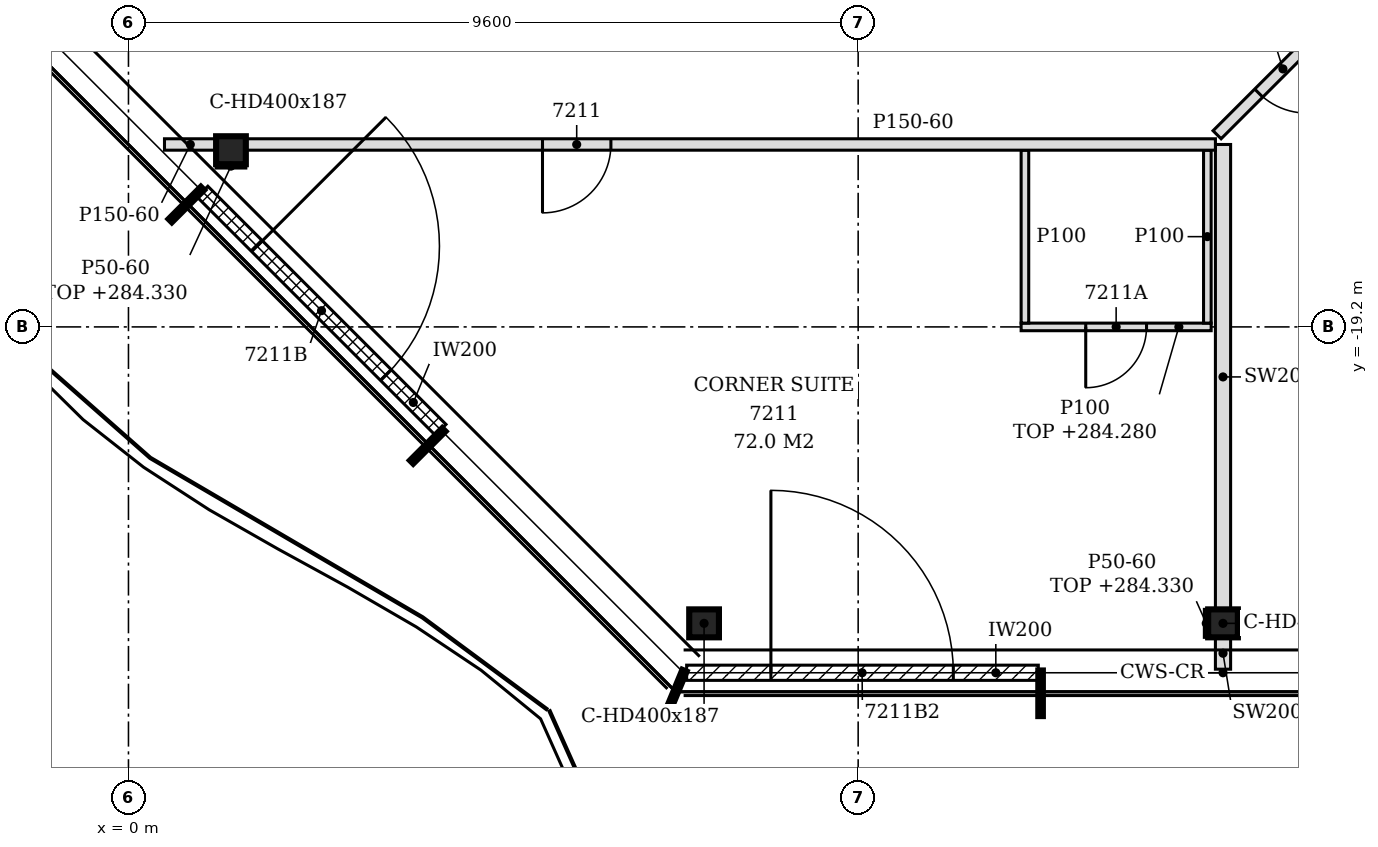
"""IFC4 building model, lengths in metres.
Left out: names, types, materials, properties, quantities, classifications, styles, units other than length and angle.
Written with IfcOpenShell. Run it as: python <this file> out.ifc"""

import sys

from ifc_helpers import new_model, si_unit, direction, frame, frame_2d, origin, origin_2d, place, context, subcontext, project, spatial, polyline, rectangle, i_section, outline, extrude, element, fill, save


model = new_model("IFC4")
c1 = context("Model", 3, precision=1e-05, world=origin(), true_north=direction((0.0, 1.0)))
c2 = subcontext(c1, "Body", "Model", "MODEL_VIEW")
j1 = project(units=[si_unit("LENGTHUNIT", "METRE"), si_unit("PLANEANGLEUNIT", "RADIAN")], contexts=[c1])
p1 = place(None, origin())
s1 = spatial("IfcSite", under=j1, at=p1, CompositionType="ELEMENT")
p2 = place(p1, origin())
s2 = spatial("IfcBuilding", under=s1, at=p2, CompositionType="ELEMENT")
p3 = place(p2, frame((0.0, 0.0, 281.4)))
s3 = spatial("IfcBuildingStorey", under=s2, at=p3, CompositionType="ELEMENT", Elevation=281.4)
for number, where, z_axis, x_axis in (
    (1, (7.573, -23.1, -0.15), (0.0, 0.0, 1.0), (1.0, 0.0, 0.0)),
    (2, (14.4, -23.1, -0.15), (0.0, 0.0, 1.0), (1.0, 0.0, 0.0)),
    (3, (1.348, -16.876, -0.15), (0.0, 0.0, 1.0), (1.0, 0.0, 0.0)),
):
    element("IfcColumn", number, at=place(p3, frame(where, z_axis=z_axis, x_axis=x_axis)), inside=s3, PredefinedType="COLUMN", context=c2, shape_type="SweptSolid", body=[
        extrude(i_section(OverallWidth=0.391, OverallDepth=0.368, WebThickness=0.015, FlangeThickness=0.024, FilletRadius=0.015, at=origin_2d()), origin(), (0.0, 0.0, 1.0), 3.6),
    ])
p4 = place(p3, frame((7.344, -23.75, 0.0), z_axis=(0.0, 0.0, 1.0), x_axis=(1.0, 0.0, 0.0)))
e4 = element("IfcWall", 4, at=p4, inside=s3, PredefinedType="NOTDEFINED", context=c2, shape_type="SweptSolid", body=[
    extrude(rectangle(XDim=4.626, YDim=0.2, at=frame_2d((2.313, 0.0))), origin(), (0.0, 0.0, 1.0), 3.45),
])
p5 = place(p4, frame((1.108, 0.0, 0.0)))
e5 = element("IfcOpeningElement", 5, at=p5, cuts=e4, PredefinedType="OPENING", context=c2, shape_type="SweptSolid", body=[
    extrude(rectangle(XDim=2.4, YDim=2.4, at=frame_2d((1.2, 1.2))), frame((0.0, 0.11, 0.0), z_axis=(0.0, -1.0, 0.0), x_axis=(1.0, 0.0, 0.0)), (0.0, 0.0, 1.0), 0.22),
])
p6 = place(p3, frame((0.974, -17.42, 0.0), z_axis=(0.0, 0.0, 1.0), x_axis=(0.707079231393, -0.707134329907, 0.0)))
e6 = element("IfcWall", 6, at=p6, inside=s3, PredefinedType="NOTDEFINED", context=c2, shape_type="SweptSolid", body=[
    extrude(rectangle(XDim=4.431, YDim=0.2, at=frame_2d((2.215, 0.0))), origin(), (0.0, 0.0, 1.0), 3.45),
])
p7 = place(p6, frame((1.015, 0.0, 0.0)))
e7 = element("IfcOpeningElement", 7, at=p7, cuts=e6, PredefinedType="OPENING", context=c2, shape_type="SweptSolid", body=[
    extrude(rectangle(XDim=2.4, YDim=2.4, at=frame_2d((1.2, 1.2))), frame((0.0, 0.11, 0.0), z_axis=(0.0, -1.0, 0.0), x_axis=(1.0, 0.0, 0.0)), (0.0, 0.0, 1.0), 0.22),
])
p8 = place(p3, frame((14.4, -23.703, 0.0), z_axis=(0.0, 0.0, 1.0), x_axis=(0.0, 1.0, 0.0)))
e8 = element("IfcWall", 8, at=p8, inside=s3, PredefinedType="PARTITIONING", context=c2, shape_type="SweptSolid", body=[
    extrude(rectangle(XDim=0.419, YDim=0.2, at=frame_2d((0.209, 0.0))), origin(), (0.0, 0.0, 1.0), 3.45),
])
p9 = place(p3, frame((14.4, -22.916, 0.0), z_axis=(0.0, 0.0, 1.0), x_axis=(0.0, 1.0, 0.0)))
e9 = element("IfcWall", 9, at=p9, inside=s3, PredefinedType="PARTITIONING", context=c2, shape_type="SweptSolid", body=[
    extrude(outline(polyline([(0.0, 0.0), (6.116, 0.0), (6.116, 3.45), (3.821, 3.45), (3.819, 2.88), (3.611, 2.88), (3.609, 3.45), (0.0, 3.45), (0.0, 0.0)])), frame((0.0, 0.1, 0.0), z_axis=(0.0, -1.0, 0.0), x_axis=(1.0, 0.0, 0.0)), (0.0, 0.0, 1.0), 0.2),
])
p10 = place(p3, frame((11.744, -19.2, 0.0), z_axis=(0.0, 0.0, 1.0), x_axis=(1.0, 0.0, 0.0)))
e10 = element("IfcWall", 10, at=p10, inside=s3, PredefinedType="PARTITIONING", context=c2, shape_type="SweptSolid", body=[
    extrude(rectangle(XDim=2.5, YDim=0.1, at=frame_2d((1.25, 0.0))), origin(), (0.0, 0.0, 1.0), 2.88),
])
p11 = place(p10, frame((0.85, 0.0, 0.0)))
e11 = element("IfcOpeningElement", 11, at=p11, cuts=e10, PredefinedType="OPENING", context=c2, shape_type="SweptSolid", body=[
    extrude(rectangle(XDim=0.8, YDim=2.1, at=frame_2d((0.4, 1.05))), frame((0.0, 0.06, 0.0), z_axis=(0.0, -1.0, 0.0), x_axis=(1.0, 0.0, 0.0)), (0.0, 0.0, 1.0), 0.12),
])
for number, where, z_axis, x_axis in (
    (12, (11.794, -19.15, 0.0), (0.0, 0.0, 1.0), (0.0, 1.0, 0.0)),
    (13, (14.194, -19.15, 0.0), (0.0, 0.0, 1.0), (0.0, 1.0, 0.0)),
):
    element("IfcWall", number, at=place(p3, frame(where, z_axis=z_axis, x_axis=x_axis)), inside=s3, PredefinedType="PARTITIONING", context=c2, shape_type="SweptSolid", body=[
        extrude(outline(polyline([(0.0, 0.0), (2.275, 0.0), (2.275, 3.45), (0.055, 3.45), (0.053, 2.88), (0.0, 2.88), (0.0, 0.0)])), frame((0.0, 0.05, 0.0), z_axis=(0.0, -1.0, 0.0), x_axis=(1.0, 0.0, 0.0)), (0.0, 0.0, 1.0), 0.1),
    ])
p12 = place(p3, frame((0.474, -16.8, 0.0), z_axis=(0.0, 0.0, 1.0), x_axis=(1.0, 0.0, 0.0)))
e14 = element("IfcWall", 14, at=p12, inside=s3, PredefinedType="PARTITIONING", context=c2, shape_type="SweptSolid", body=[
    extrude(outline(polyline([(0.0, 0.0), (0.679, 0.0), (0.679, 2.63), (0.229, 2.63), (0.227, 3.45), (0.0, 3.45), (0.0, 0.0)])), frame((0.0, 0.075, 0.0), z_axis=(0.0, -1.0, 0.0), x_axis=(1.0, 0.0, 0.0)), (0.0, 0.0, 1.0), 0.15),
])
p13 = place(p3, frame((1.544, -16.8, 0.0), z_axis=(0.0, 0.0, 1.0), x_axis=(1.0, 0.0, 0.0)))
e15 = element("IfcWall", 15, at=p13, inside=s3, PredefinedType="PARTITIONING", context=c2, shape_type="SweptSolid", body=[
    extrude(outline(polyline([(0.0, 0.0), (12.756, 0.0), (12.756, 3.45), (5.806, 3.45), (5.804, 2.73), (5.506, 2.73), (5.504, 3.45), (0.0, 3.45), (0.0, 0.0)])), frame((0.0, 0.075, 0.0), z_axis=(0.0, -1.0, 0.0), x_axis=(1.0, 0.0, 0.0)), (0.0, 0.0, 1.0), 0.15),
])
p14 = place(p13, frame((3.903, 0.0, 0.0)))
e16 = element("IfcOpeningElement", 16, at=p14, cuts=e15, PredefinedType="OPENING", context=c2, shape_type="SweptSolid", body=[
    extrude(rectangle(XDim=0.9, YDim=2.1, at=frame_2d((0.45, 1.05))), frame((0.0, 0.085, 0.0), z_axis=(0.0, -1.0, 0.0), x_axis=(1.0, 0.0, 0.0)), (0.0, 0.0, 1.0), 0.17),
])
p15 = place(p3, frame((14.322, -16.672, 0.0), z_axis=(0.0, 0.0, 1.0), x_axis=(0.707106781187, 0.707106781187, 0.0)))
e17 = element("IfcWall", 17, at=p15, inside=s3, PredefinedType="PARTITIONING", context=c2, shape_type="SweptSolid", body=[
    extrude(rectangle(XDim=23.452, YDim=0.15, at=frame_2d((11.726, 0.0))), origin(), (0.0, 0.0, 1.0), 2.73),
])
p16 = place(p15, frame((0.775, 0.0, 0.0)))
e18 = element("IfcOpeningElement", 18, at=p16, cuts=e17, PredefinedType="OPENING", context=c2, shape_type="SweptSolid", body=[
    extrude(rectangle(XDim=0.9, YDim=2.1, at=frame_2d((0.45, 1.05))), frame((0.0, 0.085, 0.0), z_axis=(0.0, -1.0, 0.0), x_axis=(1.0, 0.0, 0.0)), (0.0, 0.0, 1.0), 0.17),
])
p17 = place(p15, frame((6.489, 0.0, 0.0)))
e19 = element("IfcOpeningElement", 19, at=p17, cuts=e17, PredefinedType="OPENING", context=c2, shape_type="SweptSolid", body=[
    extrude(rectangle(XDim=0.9, YDim=2.1, at=frame_2d((0.45, 1.05))), frame((0.0, 0.085, 0.0), z_axis=(0.0, -1.0, 0.0), x_axis=(1.0, 0.0, 0.0)), (0.0, 0.0, 1.0), 0.17),
])
p18 = place(p15, frame((10.89, 0.0, 0.0)))
e20 = element("IfcOpeningElement", 20, at=p18, cuts=e17, PredefinedType="OPENING", context=c2, shape_type="SweptSolid", body=[
    extrude(rectangle(XDim=0.9, YDim=2.1, at=frame_2d((0.45, 1.05))), frame((0.0, 0.085, 0.0), z_axis=(0.0, -1.0, 0.0), x_axis=(1.0, 0.0, 0.0)), (0.0, 0.0, 1.0), 0.17),
])
p19 = place(p15, frame((14.788, 0.0, 0.0)))
e21 = element("IfcOpeningElement", 21, at=p19, cuts=e17, PredefinedType="OPENING", context=c2, shape_type="SweptSolid", body=[
    extrude(rectangle(XDim=0.9, YDim=2.1, at=frame_2d((0.45, 1.05))), frame((0.0, 0.085, 0.0), z_axis=(0.0, -1.0, 0.0), x_axis=(1.0, 0.0, 0.0)), (0.0, 0.0, 1.0), 0.17),
])
p20 = place(p15, frame((17.689, 0.0, 0.0)))
e22 = element("IfcOpeningElement", 22, at=p20, cuts=e17, PredefinedType="OPENING", context=c2, shape_type="SweptSolid", body=[
    extrude(rectangle(XDim=0.9, YDim=2.1, at=frame_2d((0.45, 1.05))), frame((0.0, 0.085, 0.0), z_axis=(0.0, -1.0, 0.0), x_axis=(1.0, 0.0, 0.0)), (0.0, 0.0, 1.0), 0.17),
])
p21 = place(p3, frame((14.179, -23.284, 0.0), z_axis=(0.0, 0.0, 1.0), x_axis=(0.0, 1.0, 0.0)))
e23 = element("IfcWall", 23, at=p21, inside=s3, PredefinedType="PARTITIONING", context=c2, shape_type="SweptSolid", body=[
    extrude(rectangle(XDim=0.368, YDim=0.05, at=frame_2d((0.184, 0.0))), origin(), (0.0, 0.0, 1.0), 2.93),
])
p22 = place(p3, frame((1.153, -17.085, 0.0), z_axis=(0.0, 0.0, 1.0), x_axis=(1.0, 0.0, 0.0)))
e24 = element("IfcWall", 24, at=p22, inside=s3, PredefinedType="PARTITIONING", context=c2, shape_type="SweptSolid", body=[
    extrude(rectangle(XDim=0.391, YDim=0.05, at=frame_2d((0.195, 0.0))), origin(), (0.0, 0.0, 1.0), 2.93),
])
p23 = place(p5, origin())
e25 = element("IfcDoor", 25, at=p23, inside=s3, OperationType="SINGLE_SWING_LEFT", PredefinedType="DOOR", context=c2, shape_type="SweptSolid", body=[
    extrude(rectangle(XDim=2.4, YDim=2.4, at=frame_2d((1.2, 1.2))), frame((0.0, 0.025, 0.0), z_axis=(0.0, -1.0, 0.0), x_axis=(1.0, 0.0, 0.0)), (0.0, 0.0, 1.0), 0.05),
])
fill(e5, e25)
p24 = place(p7, origin())
e26 = element("IfcDoor", 26, at=p24, inside=s3, OperationType="SINGLE_SWING_LEFT", PredefinedType="DOOR", context=c2, shape_type="SweptSolid", body=[
    extrude(rectangle(XDim=2.4, YDim=2.4, at=frame_2d((1.2, 1.2))), frame((0.0, 0.025, 0.0), z_axis=(0.0, -1.0, 0.0), x_axis=(1.0, 0.0, 0.0)), (0.0, 0.0, 1.0), 0.05),
])
fill(e7, e26)
p25 = place(p16, frame((0.9, 0.0, 0.0), z_axis=(0.0, 0.0, 1.0), x_axis=(-1.0, 0.0, 0.0)))
e27 = element("IfcDoor", 27, at=p25, inside=s3, OperationType="SINGLE_SWING_LEFT", PredefinedType="DOOR", context=c2, shape_type="SweptSolid", body=[
    extrude(rectangle(XDim=0.9, YDim=2.1, at=frame_2d((0.45, 1.05))), frame((0.0, 0.025, 0.0), z_axis=(0.0, -1.0, 0.0), x_axis=(1.0, 0.0, 0.0)), (0.0, 0.0, 1.0), 0.05),
])
fill(e18, e27)
p26 = place(p14, frame((0.9, 0.0, 0.0), z_axis=(0.0, 0.0, 1.0), x_axis=(-1.0, 0.0, 0.0)))
e28 = element("IfcDoor", 28, at=p26, inside=s3, OperationType="SINGLE_SWING_RIGHT", PredefinedType="DOOR", context=c2, shape_type="SweptSolid", body=[
    extrude(rectangle(XDim=0.9, YDim=2.1, at=frame_2d((0.45, 1.05))), frame((0.0, 0.025, 0.0), z_axis=(0.0, -1.0, 0.0), x_axis=(1.0, 0.0, 0.0)), (0.0, 0.0, 1.0), 0.05),
])
fill(e16, e28)
p27 = place(p11, frame((0.8, 0.0, 0.0), z_axis=(0.0, 0.0, 1.0), x_axis=(-1.0, 0.0, 0.0)))
e29 = element("IfcDoor", 29, at=p27, inside=s3, OperationType="SINGLE_SWING_RIGHT", PredefinedType="DOOR", context=c2, shape_type="SweptSolid", body=[
    extrude(rectangle(XDim=0.8, YDim=2.1, at=frame_2d((0.4, 1.05))), frame((0.0, 0.025, 0.0), z_axis=(0.0, -1.0, 0.0), x_axis=(1.0, 0.0, 0.0)), (0.0, 0.0, 1.0), 0.05),
])
fill(e11, e29)
save(model, sys.argv[1])
